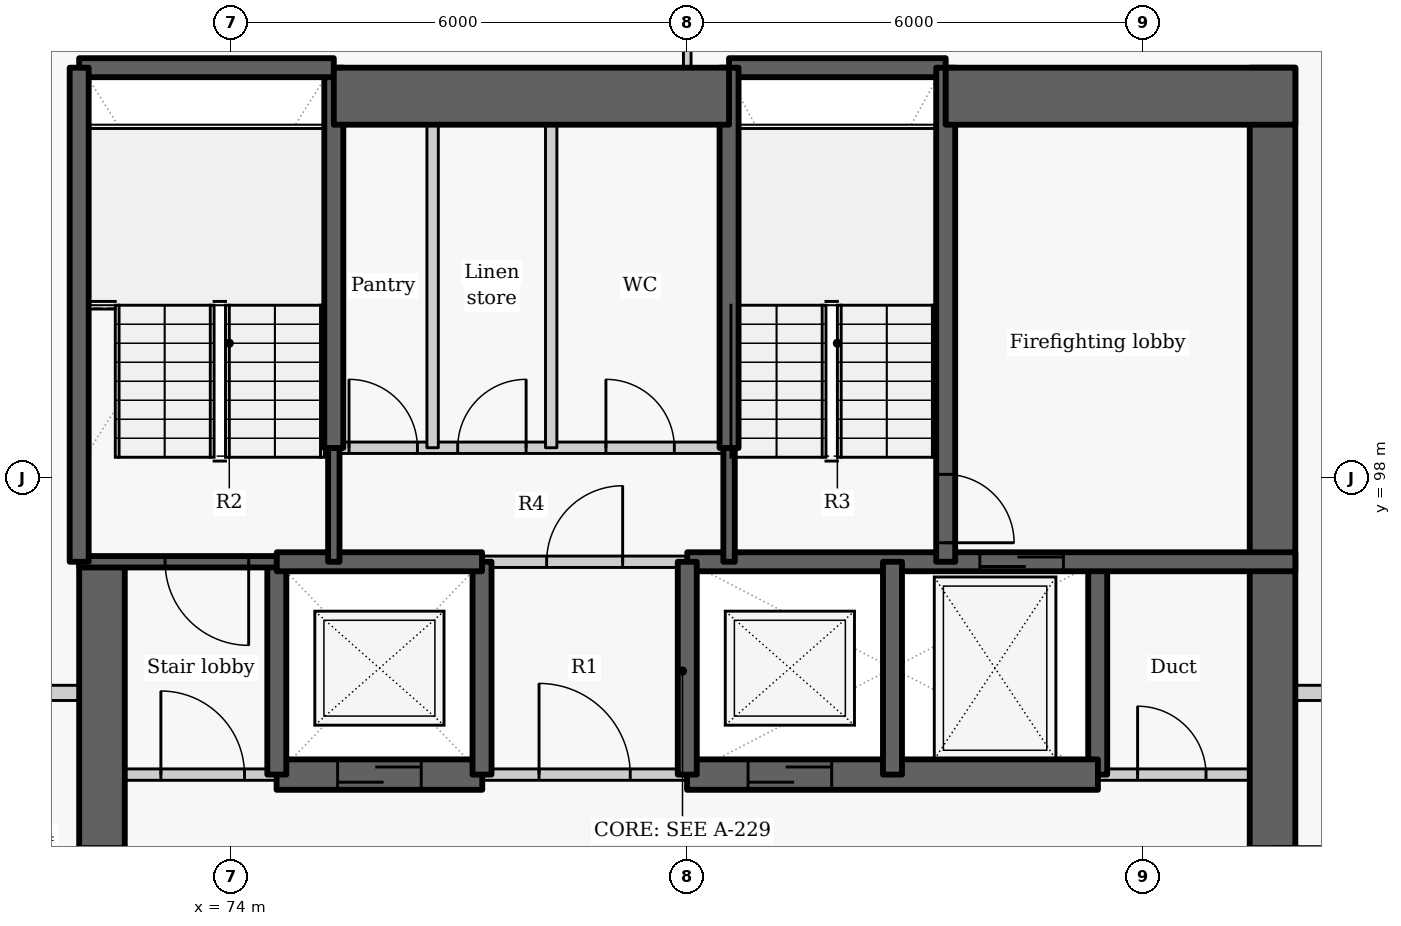
"""IFC4 building model, lengths in metres.
Left out: names, types, materials, properties, quantities, classifications, styles, units other than length and angle.
Written with IfcOpenShell. Run it as: python <this file> out.ifc"""

import sys

from ifc_helpers import new_model, si_unit, direction, frame, frame_2d, origin, place, context, subcontext, project, spatial, rectangle, extrude, element, fill, save


model = new_model("IFC4")
c1 = context("Model", 3, precision=1e-05, world=origin(), true_north=direction((0.0, 1.0)))
c2 = subcontext(c1, "Body", "Model", "MODEL_VIEW")
j1 = project(units=[si_unit("LENGTHUNIT", "METRE"), si_unit("PLANEANGLEUNIT", "RADIAN")], contexts=[c1])
p1 = place(None, origin())
s1 = spatial("IfcSite", under=j1, at=p1, CompositionType="ELEMENT")
p2 = place(p1, origin())
s2 = spatial("IfcBuilding", under=s1, at=p2, CompositionType="ELEMENT")
p3 = place(p2, frame((0.0, 0.0, 166.8)))
s3 = spatial("IfcBuildingStorey", under=s2, at=p3, CompositionType="ELEMENT", Elevation=166.8)
p4 = place(p3, frame((72.3, 87.8, -0.275), z_axis=(0.0, 0.0, 1.0), x_axis=(0.0, 1.0, 0.0)))
e1 = element("IfcWall", 1, at=p4, inside=s3, PredefinedType="SHEAR", context=c2, shape_type="SweptSolid", body=[
    extrude(rectangle(XDim=9.1, YDim=0.6, at=frame_2d((4.55, 0.0))), origin(), (0.0, 0.0, 1.0), 3.225),
])
p5 = place(p4, frame((3.852, 0.0, 0.275)))
e2 = element("IfcOpeningElement", 2, at=p5, cuts=e1, PredefinedType="OPENING", context=c2, shape_type="SweptSolid", body=[
    extrude(rectangle(XDim=1.5, YDim=2.1, at=frame_2d((0.75, 1.05))), frame((0.0, 0.31, 0.0), z_axis=(0.0, -1.0, 0.0), x_axis=(1.0, 0.0, 0.0)), (0.0, 0.0, 1.0), 0.62),
])
p6 = place(p3, frame((85.4, 94.1, -0.275), z_axis=(0.0, 0.0, 1.0), x_axis=(0.0, 1.0, 0.0)))
e3 = element("IfcWall", 3, at=p6, inside=s3, PredefinedType="SHEAR", context=c2, shape_type="SweptSolid", body=[
    extrude(rectangle(XDim=2.8, YDim=0.25, at=frame_2d((1.4, 0.0))), origin(), (0.0, 0.0, 1.0), 3.225),
])
p7 = place(p3, frame((87.7, 103.4, -0.275), z_axis=(0.0, 0.0, 1.0), x_axis=(0.0, -1.0, 0.0)))
e4 = element("IfcWall", 4, at=p7, inside=s3, PredefinedType="SHEAR", context=c2, shape_type="SweptSolid", body=[
    extrude(rectangle(XDim=15.6, YDim=0.6, at=frame_2d((7.8, 0.0))), origin(), (0.0, 0.0, 1.0), 3.225),
])
p8 = place(p7, frame((10.248, 0.0, 0.275)))
e5 = element("IfcOpeningElement", 5, at=p8, cuts=e4, PredefinedType="OPENING", context=c2, shape_type="SweptSolid", body=[
    extrude(rectangle(XDim=1.5, YDim=2.1, at=frame_2d((0.75, 1.05))), frame((0.0, 0.31, 0.0), z_axis=(0.0, -1.0, 0.0), x_axis=(1.0, 0.0, 0.0)), (0.0, 0.0, 1.0), 0.62),
])
p9 = place(p3, frame((72.0, 94.1, 0.0), z_axis=(0.0, 0.0, 1.0), x_axis=(1.0, 0.0, 0.0)))
e6 = element("IfcWall", 6, at=p9, inside=s3, PredefinedType="PARTITIONING", context=c2, shape_type="SweptSolid", body=[
    extrude(rectangle(XDim=2.603, YDim=0.15, at=frame_2d((1.302, 0.0))), origin(), (0.0, 0.0, 1.0), 2.95),
])
p10 = place(p9, frame((1.075, 0.0, 0.0)))
e7 = element("IfcOpeningElement", 7, at=p10, cuts=e6, PredefinedType="OPENING", context=c2, shape_type="SweptSolid", body=[
    extrude(rectangle(XDim=1.1, YDim=2.1, at=frame_2d((0.55, 1.05))), frame((0.0, 0.085, 0.0), z_axis=(0.0, -1.0, 0.0), x_axis=(1.0, 0.0, 0.0)), (0.0, 0.0, 1.0), 0.17),
])
p11 = place(p3, frame((77.297, 94.1, 0.0), z_axis=(0.0, 0.0, 1.0), x_axis=(1.0, 0.0, 0.0)))
e8 = element("IfcWall", 8, at=p11, inside=s3, PredefinedType="PARTITIONING", context=c2, shape_type="SweptSolid", body=[
    extrude(rectangle(XDim=2.706, YDim=0.15, at=frame_2d((1.353, 0.0))), origin(), (0.0, 0.0, 1.0), 2.95),
])
p12 = place(p11, frame((0.753, 0.0, 0.0)))
e9 = element("IfcOpeningElement", 9, at=p12, cuts=e8, PredefinedType="OPENING", context=c2, shape_type="SweptSolid", body=[
    extrude(rectangle(XDim=1.2, YDim=2.1, at=frame_2d((0.6, 1.05))), frame((0.0, 0.085, 0.0), z_axis=(0.0, -1.0, 0.0), x_axis=(1.0, 0.0, 0.0)), (0.0, 0.0, 1.0), 0.17),
])
p13 = place(p3, frame((85.397, 94.1, 0.0), z_axis=(0.0, 0.0, 1.0), x_axis=(1.0, 0.0, 0.0)))
e10 = element("IfcWall", 10, at=p13, inside=s3, PredefinedType="PARTITIONING", context=c2, shape_type="SweptSolid", body=[
    extrude(rectangle(XDim=2.603, YDim=0.15, at=frame_2d((1.302, 0.0))), origin(), (0.0, 0.0, 1.0), 2.95),
])
p14 = place(p13, frame((0.528, 0.0, 0.0)))
e11 = element("IfcOpeningElement", 11, at=p14, cuts=e10, PredefinedType="OPENING", context=c2, shape_type="SweptSolid", body=[
    extrude(rectangle(XDim=0.9, YDim=2.1, at=frame_2d((0.45, 1.05))), frame((0.0, 0.085, 0.0), z_axis=(0.0, -1.0, 0.0), x_axis=(1.0, 0.0, 0.0)), (0.0, 0.0, 1.0), 0.17),
])
p15 = place(p3, frame((74.597, 94.1, -0.275), z_axis=(0.0, 0.0, 1.0), x_axis=(1.0, 0.0, 0.0)))
e12 = element("IfcWall", 12, at=p15, inside=s3, PredefinedType="SHEAR", context=c2, shape_type="SweptSolid", body=[
    extrude(rectangle(XDim=2.706, YDim=0.4, at=frame_2d((1.353, 0.0))), origin(), (0.0, 0.0, 1.0), 3.225),
])
p16 = place(p15, frame((0.803, 0.0, 0.275)))
e13 = element("IfcOpeningElement", 13, at=p16, cuts=e12, PredefinedType="OPENING", context=c2, shape_type="SweptSolid", body=[
    extrude(rectangle(XDim=1.1, YDim=2.1, at=frame_2d((0.55, 1.05))), frame((0.0, 0.21, 0.0), z_axis=(0.0, -1.0, 0.0), x_axis=(1.0, 0.0, 0.0)), (0.0, 0.0, 1.0), 0.42),
])
p17 = place(p3, frame((79.997, 94.1, -0.275), z_axis=(0.0, 0.0, 1.0), x_axis=(1.0, 0.0, 0.0)))
e14 = element("IfcWall", 14, at=p17, inside=s3, PredefinedType="SHEAR", context=c2, shape_type="SweptSolid", body=[
    extrude(rectangle(XDim=5.406, YDim=0.4, at=frame_2d((2.703, 0.0))), origin(), (0.0, 0.0, 1.0), 3.225),
])
p18 = place(p17, frame((0.803, 0.0, 0.275)))
e15 = element("IfcOpeningElement", 15, at=p18, cuts=e14, PredefinedType="OPENING", context=c2, shape_type="SweptSolid", body=[
    extrude(rectangle(XDim=1.1, YDim=2.1, at=frame_2d((0.55, 1.05))), frame((0.0, 0.21, 0.0), z_axis=(0.0, -1.0, 0.0), x_axis=(1.0, 0.0, 0.0)), (0.0, 0.0, 1.0), 0.42),
])
p19 = place(p3, frame((74.6, 94.1, -0.275), z_axis=(0.0, 0.0, 1.0), x_axis=(0.0, 1.0, 0.0)))
e16 = element("IfcWall", 16, at=p19, inside=s3, PredefinedType="SHEAR", context=c2, shape_type="SweptSolid", body=[
    extrude(rectangle(XDim=2.8, YDim=0.25, at=frame_2d((1.4, 0.0))), origin(), (0.0, 0.0, 1.0), 3.225),
])
p20 = place(p3, frame((74.6, 96.9, -0.275), z_axis=(0.0, 0.0, 1.0), x_axis=(-1.0, 0.0, 0.0)))
e17 = element("IfcWall", 17, at=p20, inside=s3, PredefinedType="SHEAR", context=c2, shape_type="SweptSolid", body=[
    extrude(rectangle(XDim=2.6, YDim=0.15, at=frame_2d((1.3, 0.0))), origin(), (0.0, 0.0, 1.0), 3.225),
])
p21 = place(p20, frame((0.37, 0.0, 0.275)))
e18 = element("IfcOpeningElement", 18, at=p21, cuts=e17, PredefinedType="OPENING", context=c2, shape_type="SweptSolid", body=[
    extrude(rectangle(XDim=1.1, YDim=2.1, at=frame_2d((0.55, 1.05))), frame((0.0, 0.085, 0.0), z_axis=(0.0, -1.0, 0.0), x_axis=(1.0, 0.0, 0.0)), (0.0, 0.0, 1.0), 0.17),
])
p22 = place(p3, frame((77.3, 94.1, -0.275), z_axis=(0.0, 0.0, 1.0), x_axis=(0.0, 1.0, 0.0)))
e19 = element("IfcWall", 19, at=p22, inside=s3, PredefinedType="SHEAR", context=c2, shape_type="SweptSolid", body=[
    extrude(rectangle(XDim=2.8, YDim=0.25, at=frame_2d((1.4, 0.0))), origin(), (0.0, 0.0, 1.0), 3.225),
])
p23 = place(p3, frame((74.6, 96.9, -0.275), z_axis=(0.0, 0.0, 1.0), x_axis=(1.0, 0.0, 0.0)))
e20 = element("IfcWall", 20, at=p23, inside=s3, PredefinedType="SHEAR", context=c2, shape_type="SweptSolid", body=[
    extrude(rectangle(XDim=2.7, YDim=0.25, at=frame_2d((1.35, 0.0))), origin(), (0.0, 0.0, 1.0), 3.225),
])
p24 = place(p3, frame((80.0, 96.9, -0.275), z_axis=(0.0, 0.0, 1.0), x_axis=(1.0, 0.0, 0.0)))
e21 = element("IfcWall", 21, at=p24, inside=s3, PredefinedType="SHEAR", context=c2, shape_type="SweptSolid", body=[
    extrude(rectangle(XDim=8.0, YDim=0.25, at=frame_2d((4.0, 0.0))), origin(), (0.0, 0.0, 1.0), 3.225),
])
p25 = place(p24, frame((3.849, 0.0, 0.275)))
e22 = element("IfcOpeningElement", 22, at=p25, cuts=e21, PredefinedType="OPENING", context=c2, shape_type="SweptSolid", body=[
    extrude(rectangle(XDim=1.1, YDim=2.1, at=frame_2d((0.55, 1.05))), frame((0.0, 0.135, 0.0), z_axis=(0.0, -1.0, 0.0), x_axis=(1.0, 0.0, 0.0)), (0.0, 0.0, 1.0), 0.27),
])
p26 = place(p3, frame((80.0, 94.1, -0.275), z_axis=(0.0, 0.0, 1.0), x_axis=(0.0, 1.0, 0.0)))
e23 = element("IfcWall", 23, at=p26, inside=s3, PredefinedType="SHEAR", context=c2, shape_type="SweptSolid", body=[
    extrude(rectangle(XDim=2.8, YDim=0.25, at=frame_2d((1.4, 0.0))), origin(), (0.0, 0.0, 1.0), 3.225),
])
p27 = place(p3, frame((77.3, 96.9, 0.0), z_axis=(0.0, 0.0, 1.0), x_axis=(1.0, 0.0, 0.0)))
e24 = element("IfcWall", 24, at=p27, inside=s3, PredefinedType="PARTITIONING", context=c2, shape_type="SweptSolid", body=[
    extrude(rectangle(XDim=2.7, YDim=0.15, at=frame_2d((1.35, 0.0))), origin(), (0.0, 0.0, 1.0), 2.95),
])
p28 = place(p27, frame((0.85, 0.0, 0.0)))
e25 = element("IfcOpeningElement", 25, at=p28, cuts=e24, PredefinedType="OPENING", context=c2, shape_type="SweptSolid", body=[
    extrude(rectangle(XDim=1.0, YDim=2.1, at=frame_2d((0.5, 1.05))), frame((0.0, 0.085, 0.0), z_axis=(0.0, -1.0, 0.0), x_axis=(1.0, 0.0, 0.0)), (0.0, 0.0, 1.0), 0.17),
])
p29 = place(p3, frame((82.7, 94.1, -0.275), z_axis=(0.0, 0.0, 1.0), x_axis=(0.0, 1.0, 0.0)))
e26 = element("IfcWall", 26, at=p29, inside=s3, PredefinedType="SHEAR", context=c2, shape_type="SweptSolid", body=[
    extrude(rectangle(XDim=2.8, YDim=0.25, at=frame_2d((1.4, 0.0))), origin(), (0.0, 0.0, 1.0), 3.225),
])
p30 = place(p3, frame((75.35, 96.9, -0.275), z_axis=(0.0, 0.0, 1.0), x_axis=(0.0, 1.0, 0.0)))
e27 = element("IfcWall", 27, at=p30, inside=s3, PredefinedType="SHEAR", context=c2, shape_type="SweptSolid", body=[
    extrude(rectangle(XDim=1.503, YDim=0.15, at=frame_2d((0.751, 0.0))), origin(), (0.0, 0.0, 1.0), 3.225),
])
p31 = place(p3, frame((75.35, 98.397, -0.275), z_axis=(0.0, 0.0, 1.0), x_axis=(0.0, 1.0, 0.0)))
e28 = element("IfcWall", 28, at=p31, inside=s3, PredefinedType="SHEAR", context=c2, shape_type="SweptSolid", body=[
    extrude(rectangle(XDim=5.003, YDim=0.25, at=frame_2d((2.501, 0.0))), origin(), (0.0, 0.0, 1.0), 3.225),
])
p32 = place(p3, frame((72.0, 103.4, -0.275), z_axis=(0.0, 0.0, 1.0), x_axis=(1.0, 0.0, 0.0)))
e29 = element("IfcWall", 29, at=p32, inside=s3, PredefinedType="SHEAR", context=c2, shape_type="SweptSolid", body=[
    extrude(rectangle(XDim=3.35, YDim=0.25, at=frame_2d((1.675, 0.0))), origin(), (0.0, 0.0, 1.0), 3.225),
])
p33 = place(p3, frame((80.55, 103.4, -0.275), z_axis=(0.0, 0.0, 1.0), x_axis=(1.0, 0.0, 0.0)))
e30 = element("IfcWall", 30, at=p33, inside=s3, PredefinedType="SHEAR", context=c2, shape_type="SweptSolid", body=[
    extrude(rectangle(XDim=2.85, YDim=0.25, at=frame_2d((1.425, 0.0))), origin(), (0.0, 0.0, 1.0), 3.225),
])
p34 = place(p3, frame((72.0, 96.9, -0.275), z_axis=(0.0, 0.0, 1.0), x_axis=(0.0, 1.0, 0.0)))
e31 = element("IfcWall", 31, at=p34, inside=s3, PredefinedType="SHEAR", context=c2, shape_type="SweptSolid", body=[
    extrude(rectangle(XDim=6.5, YDim=0.25, at=frame_2d((3.25, 0.0))), origin(), (0.0, 0.0, 1.0), 3.225),
])
p35 = place(p3, frame((83.4, 103.4, -0.275), z_axis=(0.0, 0.0, 1.0), x_axis=(0.0, -1.0, 0.0)))
e32 = element("IfcWall", 32, at=p35, inside=s3, PredefinedType="SHEAR", context=c2, shape_type="SweptSolid", body=[
    extrude(rectangle(XDim=6.5, YDim=0.25, at=frame_2d((3.25, 0.0))), origin(), (0.0, 0.0, 1.0), 3.225),
])
p36 = place(p35, frame((5.35, 0.0, 0.275)))
e33 = element("IfcOpeningElement", 33, at=p36, cuts=e32, PredefinedType="OPENING", context=c2, shape_type="SweptSolid", body=[
    extrude(rectangle(XDim=0.9, YDim=2.1, at=frame_2d((0.45, 1.05))), frame((0.0, 0.135, 0.0), z_axis=(0.0, -1.0, 0.0), x_axis=(1.0, 0.0, 0.0)), (0.0, 0.0, 1.0), 0.27),
])
p37 = place(p3, frame((80.55, 96.9, -0.275), z_axis=(0.0, 0.0, 1.0), x_axis=(0.0, 1.0, 0.0)))
e34 = element("IfcWall", 34, at=p37, inside=s3, PredefinedType="SHEAR", context=c2, shape_type="SweptSolid", body=[
    extrude(rectangle(XDim=1.503, YDim=0.15, at=frame_2d((0.751, 0.0))), origin(), (0.0, 0.0, 1.0), 3.225),
])
p38 = place(p3, frame((80.55, 98.397, -0.275), z_axis=(0.0, 0.0, 1.0), x_axis=(0.0, 1.0, 0.0)))
e35 = element("IfcWall", 35, at=p38, inside=s3, PredefinedType="SHEAR", context=c2, shape_type="SweptSolid", body=[
    extrude(rectangle(XDim=5.003, YDim=0.25, at=frame_2d((2.501, 0.0))), origin(), (0.0, 0.0, 1.0), 3.225),
])
p39 = place(p3, frame((75.35, 103.025, -0.275), z_axis=(0.0, 0.0, 1.0), x_axis=(1.0, 0.0, 0.0)))
e36 = element("IfcWall", 36, at=p39, inside=s3, PredefinedType="SHEAR", context=c2, shape_type="SweptSolid", body=[
    extrude(rectangle(XDim=5.2, YDim=0.75, at=frame_2d((2.6, 0.0))), origin(), (0.0, 0.0, 1.0), 3.225),
])
p40 = place(p3, frame((83.4, 103.025, -0.275), z_axis=(0.0, 0.0, 1.0), x_axis=(1.0, 0.0, 0.0)))
e37 = element("IfcWall", 37, at=p40, inside=s3, PredefinedType="SHEAR", context=c2, shape_type="SweptSolid", body=[
    extrude(rectangle(XDim=4.6, YDim=0.75, at=frame_2d((2.3, 0.0))), origin(), (0.0, 0.0, 1.0), 3.225),
])
p41 = place(p3, frame((75.35, 98.4, 0.0), z_axis=(0.0, 0.0, 1.0), x_axis=(1.0, 0.0, 0.0)))
e38 = element("IfcWall", 38, at=p41, inside=s3, PredefinedType="PARTITIONING", context=c2, shape_type="SweptSolid", body=[
    extrude(rectangle(XDim=5.2, YDim=0.15, at=frame_2d((2.6, 0.0))), origin(), (0.0, 0.0, 1.0), 2.95),
])
p42 = place(p41, frame((0.2, 0.0, 0.0)))
e39 = element("IfcOpeningElement", 39, at=p42, cuts=e38, PredefinedType="OPENING", context=c2, shape_type="SweptSolid", body=[
    extrude(rectangle(XDim=0.9, YDim=2.1, at=frame_2d((0.45, 1.05))), frame((0.0, 0.085, 0.0), z_axis=(0.0, -1.0, 0.0), x_axis=(1.0, 0.0, 0.0)), (0.0, 0.0, 1.0), 0.17),
])
p43 = place(p41, frame((1.63, 0.0, 0.0)))
e40 = element("IfcOpeningElement", 40, at=p43, cuts=e38, PredefinedType="OPENING", context=c2, shape_type="SweptSolid", body=[
    extrude(rectangle(XDim=0.9, YDim=2.1, at=frame_2d((0.45, 1.05))), frame((0.0, 0.085, 0.0), z_axis=(0.0, -1.0, 0.0), x_axis=(1.0, 0.0, 0.0)), (0.0, 0.0, 1.0), 0.17),
])
p44 = place(p41, frame((3.58, 0.0, 0.0)))
e41 = element("IfcOpeningElement", 41, at=p44, cuts=e38, PredefinedType="OPENING", context=c2, shape_type="SweptSolid", body=[
    extrude(rectangle(XDim=0.9, YDim=2.1, at=frame_2d((0.45, 1.05))), frame((0.0, 0.085, 0.0), z_axis=(0.0, -1.0, 0.0), x_axis=(1.0, 0.0, 0.0)), (0.0, 0.0, 1.0), 0.17),
])
for number, where, z_axis, x_axis in (
    (42, (76.65, 98.4, 0.0), (0.0, 0.0, 1.0), (0.0, 1.0, 0.0)),
    (43, (78.21, 98.4, 0.0), (0.0, 0.0, 1.0), (0.0, 1.0, 0.0)),
):
    element("IfcWall", number, at=place(p3, frame(where, z_axis=z_axis, x_axis=x_axis)), inside=s3, PredefinedType="PARTITIONING", context=c2, shape_type="SweptSolid", body=[
        extrude(rectangle(XDim=5.0, YDim=0.15, at=frame_2d((2.5, 0.0))), origin(), (0.0, 0.0, 1.0), 2.95),
    ])
p45 = place(p3, frame((69.537, 95.175, 0.0), z_axis=(0.0, 0.0, 1.0), x_axis=(1.0, 0.0, 0.0)))
e44 = element("IfcWall", 44, at=p45, inside=s3, PredefinedType="PARTITIONING", context=c2, shape_type="SweptSolid", body=[
    extrude(rectangle(XDim=2.463, YDim=0.2, at=frame_2d((1.231, 0.0))), origin(), (0.0, 0.0, 1.0), 2.43),
])
p46 = place(p3, frame((88.0, 95.175, 0.0), z_axis=(0.0, 0.0, 1.0), x_axis=(1.0, 0.0, 0.0)))
e45 = element("IfcWall", 45, at=p46, inside=s3, PredefinedType="PARTITIONING", context=c2, shape_type="SweptSolid", body=[
    extrude(rectangle(XDim=1.423, YDim=0.2, at=frame_2d((0.711, 0.0))), origin(), (0.0, 0.0, 1.0), 2.95),
])
p47 = place(p3, frame((80.0, 103.4, 0.0), z_axis=(0.0, 0.0, 1.0), x_axis=(0.0, 1.0, 0.0)))
e46 = element("IfcWall", 46, at=p47, inside=s3, PredefinedType="PARTITIONING", context=c2, shape_type="SweptSolid", body=[
    extrude(rectangle(XDim=0.3, YDim=0.1, at=frame_2d((0.15, 0.0))), origin(), (0.0, 0.0, 1.0), 2.95),
])
p48 = place(p10, origin())
e47 = element("IfcDoor", 47, at=p48, inside=s3, OperationType="SINGLE_SWING_LEFT", PredefinedType="DOOR", context=c2, shape_type="SweptSolid", body=[
    extrude(rectangle(XDim=1.1, YDim=2.1, at=frame_2d((0.55, 1.05))), frame((0.0, 0.025, 0.0), z_axis=(0.0, -1.0, 0.0), x_axis=(1.0, 0.0, 0.0)), (0.0, 0.0, 1.0), 0.05),
])
fill(e7, e47)
p49 = place(p16, origin())
e48 = element("IfcDoor", 48, at=p49, inside=s3, OperationType="SLIDING_TO_LEFT", PredefinedType="DOOR", context=c2, shape_type="SweptSolid", body=[
    extrude(rectangle(XDim=1.1, YDim=2.1, at=frame_2d((0.55, 1.05))), frame((0.0, 0.025, 0.0), z_axis=(0.0, -1.0, 0.0), x_axis=(1.0, 0.0, 0.0)), (0.0, 0.0, 1.0), 0.05),
])
fill(e13, e48)
p50 = place(p12, origin())
e49 = element("IfcDoor", 49, at=p50, inside=s3, OperationType="DOUBLE_DOOR_SINGLE_SWING", PredefinedType="DOOR", context=c2, shape_type="SweptSolid", body=[
    extrude(rectangle(XDim=1.2, YDim=2.1, at=frame_2d((0.6, 1.05))), frame((0.0, 0.025, 0.0), z_axis=(0.0, -1.0, 0.0), x_axis=(1.0, 0.0, 0.0)), (0.0, 0.0, 1.0), 0.05),
])
fill(e9, e49)
p51 = place(p18, origin())
e50 = element("IfcDoor", 50, at=p51, inside=s3, OperationType="SLIDING_TO_LEFT", PredefinedType="DOOR", context=c2, shape_type="SweptSolid", body=[
    extrude(rectangle(XDim=1.1, YDim=2.1, at=frame_2d((0.55, 1.05))), frame((0.0, 0.025, 0.0), z_axis=(0.0, -1.0, 0.0), x_axis=(1.0, 0.0, 0.0)), (0.0, 0.0, 1.0), 0.05),
])
fill(e15, e50)
p52 = place(p25, origin())
e51 = element("IfcDoor", 51, at=p52, inside=s3, OperationType="SLIDING_TO_LEFT", PredefinedType="DOOR", context=c2, shape_type="SweptSolid", body=[
    extrude(rectangle(XDim=1.1, YDim=2.1, at=frame_2d((0.55, 1.05))), frame((0.0, 0.025, 0.0), z_axis=(0.0, -1.0, 0.0), x_axis=(1.0, 0.0, 0.0)), (0.0, 0.0, 1.0), 0.05),
])
fill(e22, e51)
p53 = place(p14, origin())
e52 = element("IfcDoor", 52, at=p53, inside=s3, OperationType="SINGLE_SWING_LEFT", PredefinedType="DOOR", context=c2, shape_type="SweptSolid", body=[
    extrude(rectangle(XDim=0.9, YDim=2.1, at=frame_2d((0.45, 1.05))), frame((0.0, 0.025, 0.0), z_axis=(0.0, -1.0, 0.0), x_axis=(1.0, 0.0, 0.0)), (0.0, 0.0, 1.0), 0.05),
])
fill(e11, e52)
p54 = place(p28, origin())
e53 = element("IfcDoor", 53, at=p54, inside=s3, OperationType="SINGLE_SWING_RIGHT", PredefinedType="DOOR", context=c2, shape_type="SweptSolid", body=[
    extrude(rectangle(XDim=1.0, YDim=2.1, at=frame_2d((0.5, 1.05))), frame((0.0, 0.025, 0.0), z_axis=(0.0, -1.0, 0.0), x_axis=(1.0, 0.0, 0.0)), (0.0, 0.0, 1.0), 0.05),
])
fill(e25, e53)
p55 = place(p42, origin())
e54 = element("IfcDoor", 54, at=p55, inside=s3, OperationType="SINGLE_SWING_LEFT", PredefinedType="DOOR", context=c2, shape_type="SweptSolid", body=[
    extrude(rectangle(XDim=0.9, YDim=2.1, at=frame_2d((0.45, 1.05))), frame((0.0, 0.025, 0.0), z_axis=(0.0, -1.0, 0.0), x_axis=(1.0, 0.0, 0.0)), (0.0, 0.0, 1.0), 0.05),
])
fill(e39, e54)
p56 = place(p43, origin())
e55 = element("IfcDoor", 55, at=p56, inside=s3, OperationType="SINGLE_SWING_RIGHT", PredefinedType="DOOR", context=c2, shape_type="SweptSolid", body=[
    extrude(rectangle(XDim=0.9, YDim=2.1, at=frame_2d((0.45, 1.05))), frame((0.0, 0.025, 0.0), z_axis=(0.0, -1.0, 0.0), x_axis=(1.0, 0.0, 0.0)), (0.0, 0.0, 1.0), 0.05),
])
fill(e40, e55)
p57 = place(p44, origin())
e56 = element("IfcDoor", 56, at=p57, inside=s3, OperationType="SINGLE_SWING_LEFT", PredefinedType="DOOR", context=c2, shape_type="SweptSolid", body=[
    extrude(rectangle(XDim=0.9, YDim=2.1, at=frame_2d((0.45, 1.05))), frame((0.0, 0.025, 0.0), z_axis=(0.0, -1.0, 0.0), x_axis=(1.0, 0.0, 0.0)), (0.0, 0.0, 1.0), 0.05),
])
fill(e41, e56)
p58 = place(p21, origin())
e57 = element("IfcDoor", 57, at=p58, inside=s3, OperationType="SINGLE_SWING_LEFT", PredefinedType="DOOR", context=c2, shape_type="SweptSolid", body=[
    extrude(rectangle(XDim=1.1, YDim=2.1, at=frame_2d((0.55, 1.05))), frame((0.0, 0.025, 0.0), z_axis=(0.0, -1.0, 0.0), x_axis=(1.0, 0.0, 0.0)), (0.0, 0.0, 1.0), 0.05),
])
fill(e18, e57)
p59 = place(p36, origin())
e58 = element("IfcDoor", 58, at=p59, inside=s3, OperationType="SINGLE_SWING_RIGHT", PredefinedType="DOOR", context=c2, shape_type="SweptSolid", body=[
    extrude(rectangle(XDim=0.9, YDim=2.1, at=frame_2d((0.45, 1.05))), frame((0.0, 0.025, 0.0), z_axis=(0.0, -1.0, 0.0), x_axis=(1.0, 0.0, 0.0)), (0.0, 0.0, 1.0), 0.05),
])
fill(e33, e58)
p60 = place(p8, origin())
e59 = element("IfcDoor", 59, at=p60, inside=s3, OperationType="DOUBLE_DOOR_SINGLE_SWING", PredefinedType="DOOR", context=c2, shape_type="SweptSolid", body=[
    extrude(rectangle(XDim=1.5, YDim=2.1, at=frame_2d((0.75, 1.05))), frame((0.0, 0.025, 0.0), z_axis=(0.0, -1.0, 0.0), x_axis=(1.0, 0.0, 0.0)), (0.0, 0.0, 1.0), 0.05),
])
fill(e5, e59)
p61 = place(p5, origin())
e60 = element("IfcDoor", 60, at=p61, inside=s3, OperationType="DOUBLE_DOOR_SINGLE_SWING", PredefinedType="DOOR", context=c2, shape_type="SweptSolid", body=[
    extrude(rectangle(XDim=1.5, YDim=2.1, at=frame_2d((0.75, 1.05))), frame((0.0, 0.025, 0.0), z_axis=(0.0, -1.0, 0.0), x_axis=(1.0, 0.0, 0.0)), (0.0, 0.0, 1.0), 0.05),
])
fill(e2, e60)
save(model, sys.argv[1])
